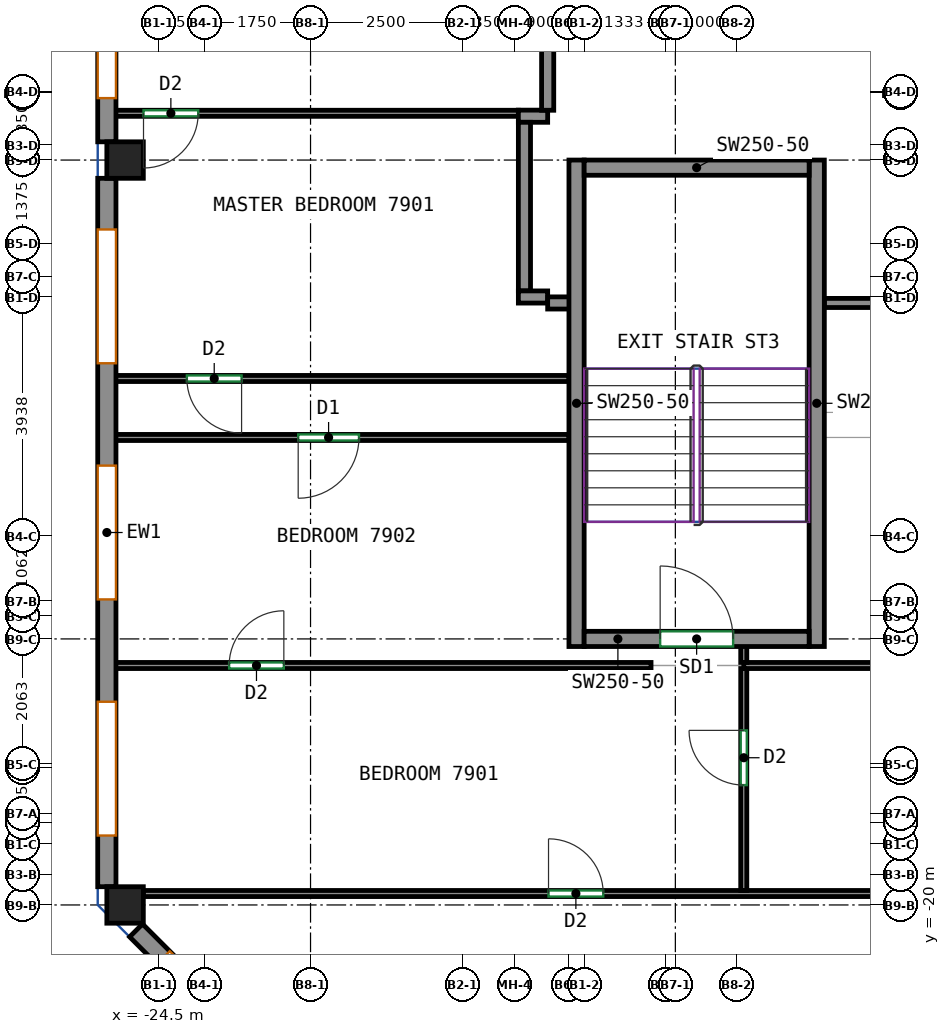
"""IFC4 building model, lengths in metres.
Left out: names, types, materials, properties, quantities, classifications, styles, units other than length and angle.
Written with IfcOpenShell. Run it as: python <this file> out.ifc"""

import sys

from ifc_helpers import new_model, si_unit, direction, frame, frame_2d, origin, origin_2d, place, context, subcontext, project, spatial, rectangle, extrude, source, transform, mapped, element, fill, save


model = new_model("IFC4")
c1 = context("Model", 3, precision=1e-05, world=origin(), true_north=direction((0.0, 1.0)))
c2 = subcontext(c1, "Body", "Model", "MODEL_VIEW")
j1 = project(units=[si_unit("LENGTHUNIT", "METRE"), si_unit("PLANEANGLEUNIT", "RADIAN")], contexts=[c1])
p1 = place(None, origin())
s1 = spatial("IfcSite", under=j1, at=p1, CompositionType="ELEMENT")
p2 = place(p1, origin())
s2 = spatial("IfcBuilding", under=s1, at=p2, CompositionType="ELEMENT")
p3 = place(p2, frame((0.0, 0.0, 315.4)))
s3 = spatial("IfcBuildingStorey", under=s2, at=p3, CompositionType="ELEMENT", Elevation=315.4)
m1 = source(origin(), c2, "Body", "SweptSolid", [
    extrude(rectangle(XDim=0.6, YDim=0.6, at=origin_2d()), origin(), (0.0, 0.0, 1.0), 3.0),
])
for number, where, z_axis, x_axis in (
    (1, (-25.05, -20.0, 0.0), (0.0, 0.0, 1.0), (1.0, 0.0, 0.0)),
    (2, (-25.05, -7.75, 0.0), (0.0, 0.0, 1.0), (1.0, 0.0, 0.0)),
):
    element("IfcColumn", number, at=place(p3, frame(where, z_axis=z_axis, x_axis=x_axis)), inside=s3, PredefinedType="COLUMN", context=c2, shape_type="MappedRepresentation", body=[
        mapped(m1, transform((0.0, 0.0, 0.0))),
    ])
m2 = source(origin(), c2, "Body", "SweptSolid", [
    extrude(rectangle(XDim=8.0, YDim=0.25, at=frame_2d((4.0, 0.0))), origin(), (0.0, 0.0, 1.0), 3.0),
])
for number, where, z_axis, x_axis in (
    (3, (-17.625, -15.75, 0.0), (0.0, 0.0, 1.0), (0.0, 1.0, 0.0)),
    (4, (-13.675, -15.75, 0.0), (0.0, 0.0, 1.0), (0.0, 1.0, 0.0)),
):
    element("IfcWall", number, at=place(p3, frame(where, z_axis=z_axis, x_axis=x_axis)), inside=s3, PredefinedType="SHEAR", context=c2, shape_type="MappedRepresentation", body=[
        mapped(m2, transform((0.0, 0.0, 0.0))),
    ])
m3 = source(origin(), c2, "Body", "SweptSolid", [
    extrude(rectangle(XDim=3.7, YDim=0.25, at=frame_2d((1.85, 0.0))), origin(), (0.0, 0.0, 1.0), 3.0),
])
p4 = place(p3, frame((-17.5, -15.625, 0.0), z_axis=(0.0, 0.0, 1.0), x_axis=(1.0, 0.0, 0.0)))
e5 = element("IfcWall", 5, at=p4, inside=s3, PredefinedType="SHEAR", context=c2, shape_type="MappedRepresentation", body=[
    mapped(m3, transform((0.0, 0.0, 0.0))),
])
p5 = place(p4, frame((1.25, 0.0, 0.0)))
e6 = element("IfcOpeningElement", 6, at=p5, cuts=e5, PredefinedType="OPENING", context=c2, shape_type="SweptSolid", body=[
    extrude(rectangle(XDim=1.2, YDim=2.1, at=frame_2d((0.6, 1.05))), frame((0.0, 0.135, 0.0), z_axis=(0.0, -1.0, 0.0), x_axis=(1.0, 0.0, 0.0)), (0.0, 0.0, 1.0), 0.27),
])
p6 = place(p3, frame((-17.5, -7.875, 0.0), z_axis=(0.0, 0.0, 1.0), x_axis=(1.0, 0.0, 0.0)))
e7 = element("IfcWall", 7, at=p6, inside=s3, PredefinedType="SHEAR", context=c2, shape_type="MappedRepresentation", body=[
    mapped(m3, transform((0.0, 0.0, 0.0))),
])
m4 = source(origin(), c2, "Body", "SweptSolid", [
    extrude(rectangle(XDim=7.275, YDim=0.3, at=frame_2d((3.637, 0.0))), origin(), (0.0, 0.0, 1.0), 3.0),
])
p7 = place(p3, frame((-25.35, -0.175, 0.0), z_axis=(0.0, 0.0, 1.0), x_axis=(0.0, -1.0, 0.0)))
e8 = element("IfcWall", 8, at=p7, inside=s3, PredefinedType="SOLIDWALL", context=c2, shape_type="MappedRepresentation", body=[
    mapped(m4, transform((0.0, 0.0, 0.0))),
])
p8 = place(p7, frame((0.719, 0.0, 0.8)))
e9 = element("IfcOpeningElement", 9, at=p8, cuts=e8, PredefinedType="OPENING", context=c2, shape_type="SweptSolid", body=[
    extrude(rectangle(XDim=2.2, YDim=2.05, at=frame_2d((1.1, 1.025))), frame((0.0, 0.16, 0.0), z_axis=(0.0, -1.0, 0.0), x_axis=(1.0, 0.0, 0.0)), (0.0, 0.0, 1.0), 0.32),
])
p9 = place(p7, frame((4.356, 0.0, 0.8)))
e10 = element("IfcOpeningElement", 10, at=p9, cuts=e8, PredefinedType="OPENING", context=c2, shape_type="SweptSolid", body=[
    extrude(rectangle(XDim=2.2, YDim=2.05, at=frame_2d((1.1, 1.025))), frame((0.0, 0.16, 0.0), z_axis=(0.0, -1.0, 0.0), x_axis=(1.0, 0.0, 0.0)), (0.0, 0.0, 1.0), 0.32),
])
m5 = source(origin(), c2, "Body", "SweptSolid", [
    extrude(rectangle(XDim=11.65, YDim=0.3, at=frame_2d((5.825, 0.0))), origin(), (0.0, 0.0, 1.0), 3.0),
])
p10 = place(p3, frame((-25.35, -8.05, 0.0), z_axis=(0.0, 0.0, 1.0), x_axis=(0.0, -1.0, 0.0)))
e11 = element("IfcWall", 11, at=p10, inside=s3, PredefinedType="SOLIDWALL", context=c2, shape_type="MappedRepresentation", body=[
    mapped(m5, transform((0.0, 0.0, 0.0))),
])
p11 = place(p10, frame((0.842, 0.0, 0.8)))
e12 = element("IfcOpeningElement", 12, at=p11, cuts=e11, PredefinedType="OPENING", context=c2, shape_type="SweptSolid", body=[
    extrude(rectangle(XDim=2.2, YDim=2.05, at=frame_2d((1.1, 1.025))), frame((0.0, 0.16, 0.0), z_axis=(0.0, -1.0, 0.0), x_axis=(1.0, 0.0, 0.0)), (0.0, 0.0, 1.0), 0.32),
])
p12 = place(p10, frame((4.725, 0.0, 0.8)))
e13 = element("IfcOpeningElement", 13, at=p12, cuts=e11, PredefinedType="OPENING", context=c2, shape_type="SweptSolid", body=[
    extrude(rectangle(XDim=2.2, YDim=2.05, at=frame_2d((1.1, 1.025))), frame((0.0, 0.16, 0.0), z_axis=(0.0, -1.0, 0.0), x_axis=(1.0, 0.0, 0.0)), (0.0, 0.0, 1.0), 0.32),
])
p13 = place(p10, frame((8.608, 0.0, 0.8)))
e14 = element("IfcOpeningElement", 14, at=p13, cuts=e11, PredefinedType="OPENING", context=c2, shape_type="SweptSolid", body=[
    extrude(rectangle(XDim=2.2, YDim=2.05, at=frame_2d((1.1, 1.025))), frame((0.0, 0.16, 0.0), z_axis=(0.0, -1.0, 0.0), x_axis=(1.0, 0.0, 0.0)), (0.0, 0.0, 1.0), 0.32),
])
m6 = source(origin(), c2, "Body", "SweptSolid", [
    extrude(rectangle(XDim=3.465, YDim=0.3, at=frame_2d((1.732, 0.0))), origin(), (0.0, 0.0, 1.0), 3.0),
])
p14 = place(p3, frame((-24.869, -20.419, 0.0), z_axis=(0.0, 0.0, 1.0), x_axis=(0.707106781187, -0.707106781187, 0.0)))
e15 = element("IfcWall", 15, at=p14, inside=s3, PredefinedType="SOLIDWALL", context=c2, shape_type="MappedRepresentation", body=[
    mapped(m6, transform((0.0, 0.0, 0.0))),
])
p15 = place(p14, frame((0.632, 0.0, 0.8)))
e16 = element("IfcOpeningElement", 16, at=p15, cuts=e15, PredefinedType="OPENING", context=c2, shape_type="SweptSolid", body=[
    extrude(rectangle(XDim=2.2, YDim=2.05, at=frame_2d((1.1, 1.025))), frame((0.0, 0.16, 0.0), z_axis=(0.0, -1.0, 0.0), x_axis=(1.0, 0.0, 0.0)), (0.0, 0.0, 1.0), 0.32),
])
p16 = place(p3, frame((-13.55, -10.1, 0.0), z_axis=(0.0, 0.0, 1.0), x_axis=(1.0, 0.0, 0.0)))
e17 = element("IfcWall", 17, at=p16, inside=s3, PredefinedType="PARTITIONING", context=c2, shape_type="SweptSolid", body=[
    extrude(rectangle(XDim=30.65, YDim=0.15, at=frame_2d((15.325, 0.0))), origin(), (0.0, 0.0, 1.0), 3.0),
])
p17 = place(p16, frame((13.442, 0.0, 0.0)))
e18 = element("IfcOpeningElement", 18, at=p17, cuts=e17, PredefinedType="OPENING", context=c2, shape_type="SweptSolid", body=[
    extrude(rectangle(XDim=0.9, YDim=2.1, at=frame_2d((0.45, 1.05))), frame((0.0, 0.085, 0.0), z_axis=(0.0, -1.0, 0.0), x_axis=(1.0, 0.0, 0.0)), (0.0, 0.0, 1.0), 0.17),
])
p18 = place(p16, frame((25.452, 0.0, 0.0)))
e19 = element("IfcOpeningElement", 19, at=p18, cuts=e17, PredefinedType="OPENING", context=c2, shape_type="SweptSolid", body=[
    extrude(rectangle(XDim=0.9, YDim=2.1, at=frame_2d((0.45, 1.05))), frame((0.0, 0.085, 0.0), z_axis=(0.0, -1.0, 0.0), x_axis=(1.0, 0.0, 0.0)), (0.0, 0.0, 1.0), 0.17),
])
p19 = place(p3, frame((-24.75, -19.812, 0.0), z_axis=(0.0, 0.0, 1.0), x_axis=(1.0, 0.0, 0.0)))
e20 = element("IfcWall", 20, at=p19, inside=s3, PredefinedType="PARTITIONING", context=c2, shape_type="SweptSolid", body=[
    extrude(rectangle(XDim=20.35, YDim=0.1, at=frame_2d((10.175, 0.0))), origin(), (0.0, 0.0, 1.0), 3.0),
])
p20 = place(p19, frame((6.664, 0.0, 0.0)))
e21 = element("IfcOpeningElement", 21, at=p20, cuts=e20, PredefinedType="OPENING", context=c2, shape_type="SweptSolid", body=[
    extrude(rectangle(XDim=0.9, YDim=2.1, at=frame_2d((0.45, 1.05))), frame((0.0, 0.06, 0.0), z_axis=(0.0, -1.0, 0.0), x_axis=(1.0, 0.0, 0.0)), (0.0, 0.0, 1.0), 0.12),
])
p21 = place(p3, frame((-14.875, -19.762, 0.0), z_axis=(0.0, 0.0, 1.0), x_axis=(0.0, 1.0, 0.0)))
e22 = element("IfcWall", 22, at=p21, inside=s3, PredefinedType="PARTITIONING", context=c2, shape_type="SweptSolid", body=[
    extrude(rectangle(XDim=3.65, YDim=0.1, at=frame_2d((1.825, 0.0))), origin(), (0.0, 0.0, 1.0), 3.0),
])
p22 = place(p21, frame((1.733, 0.0, 0.0)))
e23 = element("IfcOpeningElement", 23, at=p22, cuts=e22, PredefinedType="OPENING", context=c2, shape_type="SweptSolid", body=[
    extrude(rectangle(XDim=0.9, YDim=2.1, at=frame_2d((0.45, 1.05))), frame((0.0, 0.06, 0.0), z_axis=(0.0, -1.0, 0.0), x_axis=(1.0, 0.0, 0.0)), (0.0, 0.0, 1.0), 0.12),
])
p23 = place(p3, frame((-25.25, -16.062, 0.0), z_axis=(0.0, 0.0, 1.0), x_axis=(1.0, 0.0, 0.0)))
e24 = element("IfcWall", 24, at=p23, inside=s3, PredefinedType="PARTITIONING", context=c2, shape_type="SweptSolid", body=[
    extrude(rectangle(XDim=8.85, YDim=0.1, at=frame_2d((4.425, 0.0))), origin(), (0.0, 0.0, 1.0), 3.0),
])
p24 = place(p23, frame((1.911, 0.0, 0.0)))
e25 = element("IfcOpeningElement", 25, at=p24, cuts=e24, PredefinedType="OPENING", context=c2, shape_type="SweptSolid", body=[
    extrude(rectangle(XDim=0.9, YDim=2.1, at=frame_2d((0.45, 1.05))), frame((0.0, 0.06, 0.0), z_axis=(0.0, -1.0, 0.0), x_axis=(1.0, 0.0, 0.0)), (0.0, 0.0, 1.0), 0.12),
])
p25 = place(p3, frame((-14.875, -16.062, 0.0), z_axis=(0.0, 0.0, 1.0), x_axis=(1.0, 0.0, 0.0)))
e26 = element("IfcWall", 26, at=p25, inside=s3, PredefinedType="PARTITIONING", context=c2, shape_type="SweptSolid", body=[
    extrude(rectangle(XDim=6.45, YDim=0.1, at=frame_2d((3.225, 0.0))), origin(), (0.0, 0.0, 1.0), 3.0),
])
p26 = place(p25, frame((5.148, 0.0, 0.0)))
e27 = element("IfcOpeningElement", 27, at=p26, cuts=e26, PredefinedType="OPENING", context=c2, shape_type="SweptSolid", body=[
    extrude(rectangle(XDim=0.9, YDim=2.1, at=frame_2d((0.45, 1.05))), frame((0.0, 0.06, 0.0), z_axis=(0.0, -1.0, 0.0), x_axis=(1.0, 0.0, 0.0)), (0.0, 0.0, 1.0), 0.12),
])
p27 = place(p3, frame((-14.875, -16.012, 0.0), z_axis=(0.0, 0.0, 1.0), x_axis=(0.0, 1.0, 0.0)))
e28 = element("IfcWall", 28, at=p27, inside=s3, PredefinedType="PARTITIONING", context=c2, shape_type="SweptSolid", body=[
    extrude(rectangle(XDim=0.312, YDim=0.1, at=frame_2d((0.156, 0.0))), origin(), (0.0, 0.0, 1.0), 3.0),
])
p28 = place(p3, frame((-17.75, -12.312, 0.0), z_axis=(0.0, 0.0, 1.0), x_axis=(-1.0, 0.0, 0.0)))
e29 = element("IfcWall", 29, at=p28, inside=s3, PredefinedType="PARTITIONING", context=c2, shape_type="SweptSolid", body=[
    extrude(rectangle(XDim=7.5, YDim=0.1, at=frame_2d((3.75, 0.0))), origin(), (0.0, 0.0, 1.0), 3.0),
])
p29 = place(p28, frame((3.453, 0.0, 0.0)))
e30 = element("IfcOpeningElement", 30, at=p29, cuts=e29, PredefinedType="OPENING", context=c2, shape_type="SweptSolid", body=[
    extrude(rectangle(XDim=1.0, YDim=2.1, at=frame_2d((0.5, 1.05))), frame((0.0, 0.06, 0.0), z_axis=(0.0, -1.0, 0.0), x_axis=(1.0, 0.0, 0.0)), (0.0, 0.0, 1.0), 0.12),
])
p30 = place(p3, frame((-17.75, -11.342, 0.0), z_axis=(0.0, 0.0, 1.0), x_axis=(-1.0, 0.0, 0.0)))
e31 = element("IfcWall", 31, at=p30, inside=s3, PredefinedType="PARTITIONING", context=c2, shape_type="SweptSolid", body=[
    extrude(rectangle(XDim=7.5, YDim=0.1, at=frame_2d((3.75, 0.0))), origin(), (0.0, 0.0, 1.0), 3.0),
])
p31 = place(p30, frame((5.384, 0.0, 0.0)))
e32 = element("IfcOpeningElement", 32, at=p31, cuts=e31, PredefinedType="OPENING", context=c2, shape_type="SweptSolid", body=[
    extrude(rectangle(XDim=0.9, YDim=2.1, at=frame_2d((0.45, 1.05))), frame((0.0, 0.06, 0.0), z_axis=(0.0, -1.0, 0.0), x_axis=(1.0, 0.0, 0.0)), (0.0, 0.0, 1.0), 0.12),
])
p32 = place(p3, frame((-18.582, -6.981, 0.0), z_axis=(0.0, 0.0, 1.0), x_axis=(-1.0, 0.0, 0.0)))
e33 = element("IfcWall", 33, at=p32, inside=s3, PredefinedType="PARTITIONING", context=c2, shape_type="SweptSolid", body=[
    extrude(rectangle(XDim=6.668, YDim=0.1, at=frame_2d((3.334, 0.0))), origin(), (0.0, 0.0, 1.0), 3.0),
])
p33 = place(p32, frame((5.265, 0.0, 0.0)))
e34 = element("IfcOpeningElement", 34, at=p33, cuts=e33, PredefinedType="OPENING", context=c2, shape_type="SweptSolid", body=[
    extrude(rectangle(XDim=0.9, YDim=2.1, at=frame_2d((0.45, 1.05))), frame((0.0, 0.06, 0.0), z_axis=(0.0, -1.0, 0.0), x_axis=(1.0, 0.0, 0.0)), (0.0, 0.0, 1.0), 0.12),
])
p34 = place(p3, frame((-18.582, -7.029, 0.0), z_axis=(0.0, 0.0, 1.0), x_axis=(1.0, 0.0, 0.0)))
e35 = element("IfcWall", 35, at=p34, inside=s3, PredefinedType="PARTITIONING", context=c2, shape_type="SweptSolid", body=[
    extrude(rectangle(XDim=0.482, YDim=0.2, at=frame_2d((0.241, 0.0))), origin(), (0.0, 0.0, 1.0), 3.0),
])
p35 = place(p3, frame((-18.482, -9.902, 0.0), z_axis=(0.0, 0.0, 1.0), x_axis=(0.0, 1.0, 0.0)))
e36 = element("IfcWall", 36, at=p35, inside=s3, PredefinedType="PARTITIONING", context=c2, shape_type="SweptSolid", body=[
    extrude(rectangle(XDim=2.773, YDim=0.2, at=frame_2d((1.387, 0.0))), origin(), (0.0, 0.0, 1.0), 3.0),
])
p36 = place(p3, frame((-18.1, -10.002, 0.0), z_axis=(0.0, 0.0, 1.0), x_axis=(-1.0, 0.0, 0.0)))
e37 = element("IfcWall", 37, at=p36, inside=s3, PredefinedType="PARTITIONING", context=c2, shape_type="SweptSolid", body=[
    extrude(rectangle(XDim=0.482, YDim=0.2, at=frame_2d((0.241, 0.0))), origin(), (0.0, 0.0, 1.0), 3.0),
])
p37 = place(p3, frame((-17.7, -10.1, 0.0), z_axis=(0.0, 0.0, 1.0), x_axis=(-1.0, 0.0, 0.0)))
e38 = element("IfcWall", 38, at=p37, inside=s3, PredefinedType="PARTITIONING", context=c2, shape_type="SweptSolid", body=[
    extrude(rectangle(XDim=0.4, YDim=0.2, at=frame_2d((0.2, 0.0))), origin(), (0.0, 0.0, 1.0), 3.0),
])
p38 = place(p3, frame((-18.1, -6.931, 0.0), z_axis=(0.0, 0.0, 1.0), x_axis=(0.0, 1.0, 0.0)))
e39 = element("IfcWall", 39, at=p38, inside=s3, PredefinedType="PARTITIONING", context=c2, shape_type="SweptSolid", body=[
    extrude(rectangle(XDim=7.693, YDim=0.2, at=frame_2d((3.846, 0.0))), origin(), (0.0, 0.0, 1.0), 3.0),
])
p39 = place(p9, origin())
e40 = element("IfcWindow", 40, at=p39, inside=s3, PartitioningType="SINGLE_PANEL", PredefinedType="WINDOW", context=c2, shape_type="SweptSolid", body=[
    extrude(rectangle(XDim=2.2, YDim=2.05, at=frame_2d((1.1, 1.025))), frame((0.0, 0.03, 0.0), z_axis=(0.0, -1.0, 0.0), x_axis=(1.0, 0.0, 0.0)), (0.0, 0.0, 1.0), 0.06),
])
fill(e10, e40)
p40 = place(p11, origin())
e41 = element("IfcWindow", 41, at=p40, inside=s3, PartitioningType="SINGLE_PANEL", PredefinedType="WINDOW", context=c2, shape_type="SweptSolid", body=[
    extrude(rectangle(XDim=2.2, YDim=2.05, at=frame_2d((1.1, 1.025))), frame((0.0, 0.03, 0.0), z_axis=(0.0, -1.0, 0.0), x_axis=(1.0, 0.0, 0.0)), (0.0, 0.0, 1.0), 0.06),
])
fill(e12, e41)
p41 = place(p12, origin())
e42 = element("IfcWindow", 42, at=p41, inside=s3, PartitioningType="SINGLE_PANEL", PredefinedType="WINDOW", context=c2, shape_type="SweptSolid", body=[
    extrude(rectangle(XDim=2.2, YDim=2.05, at=frame_2d((1.1, 1.025))), frame((0.0, 0.03, 0.0), z_axis=(0.0, -1.0, 0.0), x_axis=(1.0, 0.0, 0.0)), (0.0, 0.0, 1.0), 0.06),
])
fill(e13, e42)
p42 = place(p13, origin())
e43 = element("IfcWindow", 43, at=p42, inside=s3, PartitioningType="SINGLE_PANEL", PredefinedType="WINDOW", context=c2, shape_type="SweptSolid", body=[
    extrude(rectangle(XDim=2.2, YDim=2.05, at=frame_2d((1.1, 1.025))), frame((0.0, 0.03, 0.0), z_axis=(0.0, -1.0, 0.0), x_axis=(1.0, 0.0, 0.0)), (0.0, 0.0, 1.0), 0.06),
])
fill(e14, e43)
p43 = place(p5, origin())
e44 = element("IfcDoor", 44, at=p43, inside=s3, OperationType="DOUBLE_DOOR_SINGLE_SWING", PredefinedType="DOOR", context=c2, shape_type="SweptSolid", body=[
    extrude(rectangle(XDim=1.2, YDim=2.1, at=frame_2d((0.6, 1.05))), frame((0.0, 0.025, 0.0), z_axis=(0.0, -1.0, 0.0), x_axis=(1.0, 0.0, 0.0)), (0.0, 0.0, 1.0), 0.05),
])
fill(e6, e44)
p44 = place(p20, origin())
e45 = element("IfcDoor", 45, at=p44, inside=s3, OperationType="SINGLE_SWING_LEFT", PredefinedType="DOOR", context=c2, shape_type="SweptSolid", body=[
    extrude(rectangle(XDim=0.9, YDim=2.1, at=frame_2d((0.45, 1.05))), frame((0.0, 0.025, 0.0), z_axis=(0.0, -1.0, 0.0), x_axis=(1.0, 0.0, 0.0)), (0.0, 0.0, 1.0), 0.05),
])
fill(e21, e45)
p45 = place(p22, origin())
e46 = element("IfcDoor", 46, at=p45, inside=s3, OperationType="SINGLE_SWING_RIGHT", PredefinedType="DOOR", context=c2, shape_type="SweptSolid", body=[
    extrude(rectangle(XDim=0.9, YDim=2.1, at=frame_2d((0.45, 1.05))), frame((0.0, 0.025, 0.0), z_axis=(0.0, -1.0, 0.0), x_axis=(1.0, 0.0, 0.0)), (0.0, 0.0, 1.0), 0.05),
])
fill(e23, e46)
p46 = place(p24, origin())
e47 = element("IfcDoor", 47, at=p46, inside=s3, OperationType="SINGLE_SWING_RIGHT", PredefinedType="DOOR", context=c2, shape_type="SweptSolid", body=[
    extrude(rectangle(XDim=0.9, YDim=2.1, at=frame_2d((0.45, 1.05))), frame((0.0, 0.025, 0.0), z_axis=(0.0, -1.0, 0.0), x_axis=(1.0, 0.0, 0.0)), (0.0, 0.0, 1.0), 0.05),
])
fill(e25, e47)
p47 = place(p29, origin())
e48 = element("IfcDoor", 48, at=p47, inside=s3, OperationType="SINGLE_SWING_RIGHT", PredefinedType="DOOR", context=c2, shape_type="SweptSolid", body=[
    extrude(rectangle(XDim=1.0, YDim=2.1, at=frame_2d((0.5, 1.05))), frame((0.0, 0.025, 0.0), z_axis=(0.0, -1.0, 0.0), x_axis=(1.0, 0.0, 0.0)), (0.0, 0.0, 1.0), 0.05),
])
fill(e30, e48)
p48 = place(p31, origin())
e49 = element("IfcDoor", 49, at=p48, inside=s3, OperationType="SINGLE_SWING_LEFT", PredefinedType="DOOR", context=c2, shape_type="SweptSolid", body=[
    extrude(rectangle(XDim=0.9, YDim=2.1, at=frame_2d((0.45, 1.05))), frame((0.0, 0.025, 0.0), z_axis=(0.0, -1.0, 0.0), x_axis=(1.0, 0.0, 0.0)), (0.0, 0.0, 1.0), 0.05),
])
fill(e32, e49)
p49 = place(p33, origin())
e50 = element("IfcDoor", 50, at=p49, inside=s3, OperationType="SINGLE_SWING_RIGHT", PredefinedType="DOOR", context=c2, shape_type="SweptSolid", body=[
    extrude(rectangle(XDim=0.9, YDim=2.1, at=frame_2d((0.45, 1.05))), frame((0.0, 0.025, 0.0), z_axis=(0.0, -1.0, 0.0), x_axis=(1.0, 0.0, 0.0)), (0.0, 0.0, 1.0), 0.05),
])
fill(e34, e50)
save(model, sys.argv[1])
